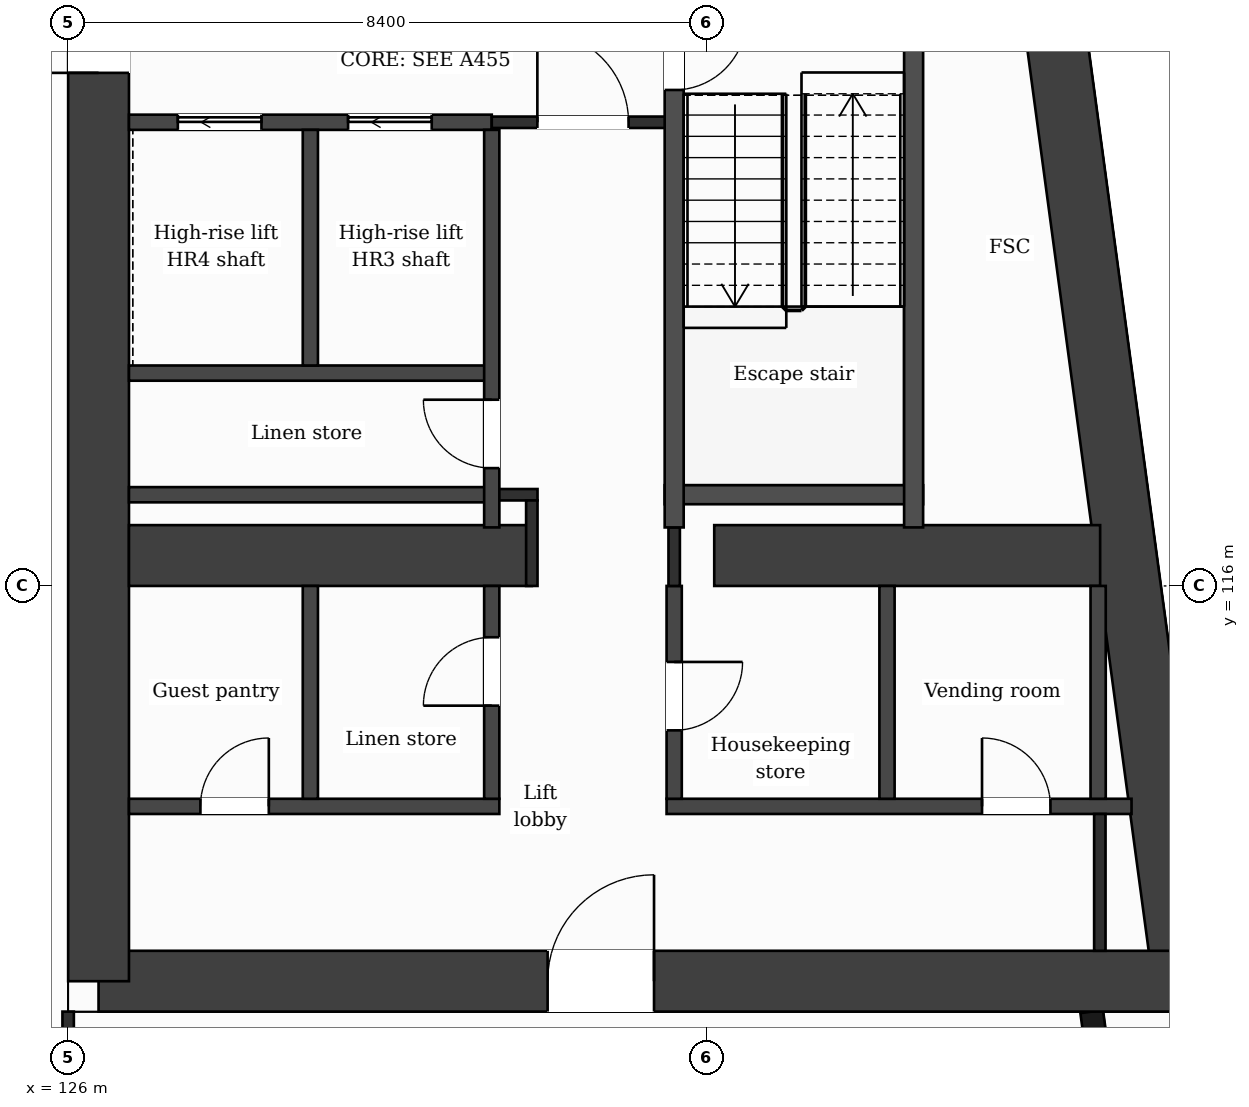
"""IFC4 building model, lengths in metres.
Left out: names, types, materials, properties, quantities, classifications, styles, units other than length and angle.
Written with IfcOpenShell. Run it as: python <this file> out.ifc"""

import sys

from ifc_helpers import new_model, si_unit, direction, frame, frame_2d, origin, place, context, subcontext, project, spatial, rectangle, extrude, element, fill, save


model = new_model("IFC4")
c1 = context("Model", 3, precision=1e-05, world=origin(), true_north=direction((0.0, 1.0)))
c2 = subcontext(c1, "Body", "Model", "MODEL_VIEW")
j1 = project(units=[si_unit("LENGTHUNIT", "METRE"), si_unit("PLANEANGLEUNIT", "RADIAN")], contexts=[c1])
p1 = place(None, origin())
s1 = spatial("IfcSite", under=j1, at=p1, CompositionType="ELEMENT")
p2 = place(p1, origin())
s2 = spatial("IfcBuilding", under=s1, at=p2, CompositionType="ELEMENT")
p3 = place(p2, frame((0.0, 0.0, 224.4)))
s3 = spatial("IfcBuildingStorey", under=s2, at=p3, CompositionType="ELEMENT", Elevation=224.4)
p4 = place(p3, frame((137.82, 132.0, 0.0), z_axis=(0.0, 0.0, 1.0), x_axis=(0.133408347329, -0.991061154956, 0.0)))
e1 = element("IfcWall", 1, at=p4, inside=s3, PredefinedType="SHEAR", context=c2, shape_type="SweptSolid", body=[
    extrude(rectangle(XDim=21.391, YDim=0.8, at=frame_2d((10.696, 0.0))), origin(), (0.0, 0.0, 1.0), 3.7),
])
p5 = place(p3, frame((140.673, 110.8, 0.0), z_axis=(0.0, 0.0, 1.0), x_axis=(-1.0, 0.0, 0.0)))
e2 = element("IfcWall", 2, at=p5, inside=s3, PredefinedType="SHEAR", context=c2, shape_type="SweptSolid", body=[
    extrude(rectangle(XDim=14.273, YDim=0.8, at=frame_2d((7.137, 0.0))), origin(), (0.0, 0.0, 1.0), 3.7),
])
p6 = place(p5, frame((6.965, 0.0, 0.0)))
e3 = element("IfcOpeningElement", 3, at=p6, cuts=e2, PredefinedType="OPENING", context=c2, shape_type="SweptSolid", body=[
    extrude(rectangle(XDim=1.4, YDim=2.1, at=frame_2d((0.7, 1.05))), frame((0.0, 0.41, 0.0), z_axis=(0.0, -1.0, 0.0), x_axis=(1.0, 0.0, 0.0)), (0.0, 0.0, 1.0), 0.82),
])
p7 = place(p3, frame((126.4, 110.8, 0.0), z_axis=(0.0, 0.0, 1.0), x_axis=(0.0, 1.0, 0.0)))
e4 = element("IfcWall", 4, at=p7, inside=s3, PredefinedType="SHEAR", context=c2, shape_type="SweptSolid", body=[
    extrude(rectangle(XDim=21.2, YDim=0.8, at=frame_2d((10.6, 0.0))), origin(), (0.0, 0.0, 1.0), 3.7),
])
p8 = place(p7, frame((11.95, 0.0, 0.0)))
e5 = element("IfcOpeningElement", 5, at=p8, cuts=e4, PredefinedType="OPENING", context=c2, shape_type="SweptSolid", body=[
    extrude(rectangle(XDim=1.4, YDim=2.1, at=frame_2d((0.7, 1.05))), frame((0.0, 0.41, 0.0), z_axis=(0.0, -1.0, 0.0), x_axis=(1.0, 0.0, 0.0)), (0.0, 0.0, 1.0), 0.82),
])
p9 = place(p3, frame((126.8, 116.4, 0.0), z_axis=(0.0, 0.0, 1.0), x_axis=(1.0, 0.0, 0.0)))
e6 = element("IfcWall", 6, at=p9, inside=s3, PredefinedType="SHEAR", context=c2, shape_type="SweptSolid", body=[
    extrude(rectangle(XDim=5.3, YDim=0.8, at=frame_2d((2.65, 0.0))), origin(), (0.0, 0.0, 1.0), 3.7),
])
p10 = place(p3, frame((134.5, 116.4, 0.0), z_axis=(0.0, 0.0, 1.0), x_axis=(1.0, 0.0, 0.0)))
e7 = element("IfcWall", 7, at=p10, inside=s3, PredefinedType="SHEAR", context=c2, shape_type="SweptSolid", body=[
    extrude(rectangle(XDim=5.077, YDim=0.8, at=frame_2d((2.539, 0.0))), origin(), (0.0, 0.0, 1.0), 3.7),
])
p11 = place(p3, frame((140.348, 103.85, 0.0), z_axis=(0.0, 0.0, 1.0), x_axis=(-0.133431549479, 0.991058031401, 0.0)))
e8 = element("IfcWall", 8, at=p11, inside=s3, PredefinedType="SOLIDWALL", context=c2, shape_type="SweptSolid", body=[
    extrude(rectangle(XDim=6.609, YDim=0.3, at=frame_2d((3.304, 0.0))), origin(), (0.0, 0.0, 1.0), 3.38),
])
p12 = place(p11, frame((0.737, 0.0, 0.9)))
e9 = element("IfcOpeningElement", 9, at=p12, cuts=e8, PredefinedType="OPENING", context=c2, shape_type="SweptSolid", body=[
    extrude(rectangle(XDim=1.2, YDim=2.1, at=frame_2d((0.6, 1.05))), frame((0.0, 0.16, 0.0), z_axis=(0.0, -1.0, 0.0), x_axis=(1.0, 0.0, 0.0)), (0.0, 0.0, 1.0), 0.32),
])
p13 = place(p11, frame((3.991, 0.0, 0.0)))
e10 = element("IfcOpeningElement", 10, at=p13, cuts=e8, PredefinedType="OPENING", context=c2, shape_type="SweptSolid", body=[
    extrude(rectangle(XDim=1.2, YDim=2.4, at=frame_2d((0.6, 1.2))), frame((0.0, 0.16, 0.0), z_axis=(0.0, -1.0, 0.0), x_axis=(1.0, 0.0, 0.0)), (0.0, 0.0, 1.0), 0.32),
])
p14 = place(p3, frame((126.8, 113.1, 0.0), z_axis=(0.0, 0.0, 1.0), x_axis=(1.0, 0.0, 0.0)))
e11 = element("IfcWall", 11, at=p14, inside=s3, PredefinedType="PARTITIONING", context=c2, shape_type="SweptSolid", body=[
    extrude(rectangle(XDim=4.873, YDim=0.2, at=frame_2d((2.437, 0.0))), origin(), (0.0, 0.0, 1.0), 3.38),
])
p15 = place(p14, frame((0.94, 0.0, 0.0)))
e12 = element("IfcOpeningElement", 12, at=p15, cuts=e11, PredefinedType="OPENING", context=c2, shape_type="SweptSolid", body=[
    extrude(rectangle(XDim=0.9, YDim=2.1, at=frame_2d((0.45, 1.05))), frame((0.0, 0.11, 0.0), z_axis=(0.0, -1.0, 0.0), x_axis=(1.0, 0.0, 0.0)), (0.0, 0.0, 1.0), 0.22),
])
p16 = place(p3, frame((133.873, 113.1, 0.0), z_axis=(0.0, 0.0, 1.0), x_axis=(1.0, 0.0, 0.0)))
e13 = element("IfcWall", 13, at=p16, inside=s3, PredefinedType="PARTITIONING", context=c2, shape_type="SweptSolid", body=[
    extrude(rectangle(XDim=6.117, YDim=0.2, at=frame_2d((3.059, 0.0))), origin(), (0.0, 0.0, 1.0), 3.38),
])
p17 = place(p16, frame((4.15, 0.0, 0.0)))
e14 = element("IfcOpeningElement", 14, at=p17, cuts=e13, PredefinedType="OPENING", context=c2, shape_type="SweptSolid", body=[
    extrude(rectangle(XDim=0.9, YDim=2.1, at=frame_2d((0.45, 1.05))), frame((0.0, 0.11, 0.0), z_axis=(0.0, -1.0, 0.0), x_axis=(1.0, 0.0, 0.0)), (0.0, 0.0, 1.0), 0.22),
])
p18 = place(p3, frame((126.8, 117.2, 0.0), z_axis=(0.0, 0.0, 1.0), x_axis=(1.0, 0.0, 0.0)))
e15 = element("IfcWall", 15, at=p18, inside=s3, PredefinedType="PARTITIONING", context=c2, shape_type="SweptSolid", body=[
    extrude(rectangle(XDim=4.773, YDim=0.2, at=frame_2d((2.386, 0.0))), origin(), (0.0, 0.0, 1.0), 3.38),
])
p19 = place(p3, frame((131.573, 117.2, 0.0), z_axis=(0.0, 0.0, 1.0), x_axis=(1.0, 0.0, 0.0)))
e16 = element("IfcWall", 16, at=p19, inside=s3, PredefinedType="PARTITIONING", context=c2, shape_type="SweptSolid", body=[
    extrude(rectangle(XDim=0.602, YDim=0.15, at=frame_2d((0.301, 0.0))), origin(), (0.0, 0.0, 1.0), 3.38),
])
p20 = place(p3, frame((133.848, 117.2, 0.0), z_axis=(0.0, 0.0, 1.0), x_axis=(1.0, 0.0, 0.0)))
e17 = element("IfcWall", 17, at=p20, inside=s3, PredefinedType="PARTITIONING", context=c2, shape_type="SweptSolid", body=[
    extrude(rectangle(XDim=3.4, YDim=0.25, at=frame_2d((1.7, 0.0))), origin(), (0.0, 0.0, 1.0), 3.38),
])
p21 = place(p3, frame((126.8, 118.8, 0.0), z_axis=(0.0, 0.0, 1.0), x_axis=(1.0, 0.0, 0.0)))
e18 = element("IfcWall", 18, at=p21, inside=s3, PredefinedType="PARTITIONING", context=c2, shape_type="SweptSolid", body=[
    extrude(rectangle(XDim=4.773, YDim=0.2, at=frame_2d((2.386, 0.0))), origin(), (0.0, 0.0, 1.0), 3.38),
])
p22 = place(p3, frame((126.8, 122.1, 0.0), z_axis=(0.0, 0.0, 1.0), x_axis=(1.0, 0.0, 0.0)))
e19 = element("IfcWall", 19, at=p22, inside=s3, PredefinedType="PARTITIONING", context=c2, shape_type="SweptSolid", body=[
    extrude(rectangle(XDim=4.773, YDim=0.2, at=frame_2d((2.386, 0.0))), origin(), (0.0, 0.0, 1.0), 3.38),
])
p23 = place(p22, frame((2.883, 0.0, 0.0)))
e20 = element("IfcOpeningElement", 20, at=p23, cuts=e19, PredefinedType="OPENING", context=c2, shape_type="SweptSolid", body=[
    extrude(rectangle(XDim=1.1, YDim=2.1, at=frame_2d((0.55, 1.05))), frame((0.0, 0.11, 0.0), z_axis=(0.0, -1.0, 0.0), x_axis=(1.0, 0.0, 0.0)), (0.0, 0.0, 1.0), 0.22),
])
p24 = place(p22, frame((0.643, 0.0, 0.0)))
e21 = element("IfcOpeningElement", 21, at=p24, cuts=e19, PredefinedType="OPENING", context=c2, shape_type="SweptSolid", body=[
    extrude(rectangle(XDim=1.1, YDim=2.1, at=frame_2d((0.55, 1.05))), frame((0.0, 0.11, 0.0), z_axis=(0.0, -1.0, 0.0), x_axis=(1.0, 0.0, 0.0)), (0.0, 0.0, 1.0), 0.22),
])
p25 = place(p3, frame((131.573, 122.1, 0.0), z_axis=(0.0, 0.0, 1.0), x_axis=(1.0, 0.0, 0.0)))
e22 = element("IfcWall", 22, at=p25, inside=s3, PredefinedType="PARTITIONING", context=c2, shape_type="SweptSolid", body=[
    extrude(rectangle(XDim=2.4, YDim=0.15, at=frame_2d((1.2, 0.0))), origin(), (0.0, 0.0, 1.0), 3.38),
])
p26 = place(p25, frame((0.6, 0.0, 0.0)))
e23 = element("IfcOpeningElement", 23, at=p26, cuts=e22, PredefinedType="OPENING", context=c2, shape_type="SweptSolid", body=[
    extrude(rectangle(XDim=1.2, YDim=2.1, at=frame_2d((0.6, 1.05))), frame((0.0, 0.085, 0.0), z_axis=(0.0, -1.0, 0.0), x_axis=(1.0, 0.0, 0.0)), (0.0, 0.0, 1.0), 0.17),
])
p27 = place(p3, frame((126.0, 109.075, 0.0), z_axis=(0.0, 0.0, 1.0), x_axis=(0.0, 1.0, 0.0)))
e24 = element("IfcWall", 24, at=p27, inside=s3, PredefinedType="PARTITIONING", context=c2, shape_type="SweptSolid", body=[
    extrude(rectangle(XDim=1.325, YDim=0.15, at=frame_2d((0.663, 0.0))), origin(), (0.0, 0.0, 1.0), 3.38),
])
p28 = place(p3, frame((129.187, 113.2, 0.0), z_axis=(0.0, 0.0, 1.0), x_axis=(0.0, 1.0, 0.0)))
e25 = element("IfcWall", 25, at=p28, inside=s3, PredefinedType="PARTITIONING", context=c2, shape_type="SweptSolid", body=[
    extrude(rectangle(XDim=2.8, YDim=0.2, at=frame_2d((1.4, 0.0))), origin(), (0.0, 0.0, 1.0), 3.38),
])
p29 = place(p3, frame((129.187, 118.9, 0.0), z_axis=(0.0, 0.0, 1.0), x_axis=(0.0, 1.0, 0.0)))
e26 = element("IfcWall", 26, at=p29, inside=s3, PredefinedType="PARTITIONING", context=c2, shape_type="SweptSolid", body=[
    extrude(rectangle(XDim=3.1, YDim=0.2, at=frame_2d((1.55, 0.0))), origin(), (0.0, 0.0, 1.0), 3.38),
])
p30 = place(p3, frame((131.573, 113.2, 0.0), z_axis=(0.0, 0.0, 1.0), x_axis=(0.0, 1.0, 0.0)))
e27 = element("IfcWall", 27, at=p30, inside=s3, PredefinedType="PARTITIONING", context=c2, shape_type="SweptSolid", body=[
    extrude(rectangle(XDim=2.8, YDim=0.2, at=frame_2d((1.4, 0.0))), origin(), (0.0, 0.0, 1.0), 3.38),
])
p31 = place(p30, frame((1.225, 0.0, 0.0)))
e28 = element("IfcOpeningElement", 28, at=p31, cuts=e27, PredefinedType="OPENING", context=c2, shape_type="SweptSolid", body=[
    extrude(rectangle(XDim=0.9, YDim=2.1, at=frame_2d((0.45, 1.05))), frame((0.0, 0.11, 0.0), z_axis=(0.0, -1.0, 0.0), x_axis=(1.0, 0.0, 0.0)), (0.0, 0.0, 1.0), 0.22),
])
p32 = place(p3, frame((131.573, 116.77, 0.0), z_axis=(0.0, 0.0, 1.0), x_axis=(0.0, 1.0, 0.0)))
e29 = element("IfcWall", 29, at=p32, inside=s3, PredefinedType="PARTITIONING", context=c2, shape_type="SweptSolid", body=[
    extrude(rectangle(XDim=5.23, YDim=0.2, at=frame_2d((2.615, 0.0))), origin(), (0.0, 0.0, 1.0), 3.38),
])
p33 = place(p32, frame((0.78, 0.0, 0.0)))
e30 = element("IfcOpeningElement", 30, at=p33, cuts=e29, PredefinedType="OPENING", context=c2, shape_type="SweptSolid", body=[
    extrude(rectangle(XDim=0.9, YDim=2.1, at=frame_2d((0.45, 1.05))), frame((0.0, 0.11, 0.0), z_axis=(0.0, -1.0, 0.0), x_axis=(1.0, 0.0, 0.0)), (0.0, 0.0, 1.0), 0.22),
])
p34 = place(p3, frame((132.1, 116.0, 0.0), z_axis=(0.0, 0.0, 1.0), x_axis=(0.0, 1.0, 0.0)))
e31 = element("IfcWall", 31, at=p34, inside=s3, PredefinedType="PARTITIONING", context=c2, shape_type="SweptSolid", body=[
    extrude(rectangle(XDim=1.125, YDim=0.15, at=frame_2d((0.562, 0.0))), origin(), (0.0, 0.0, 1.0), 3.38),
])
p35 = place(p3, frame((133.973, 113.2, 0.0), z_axis=(0.0, 0.0, 1.0), x_axis=(0.0, 1.0, 0.0)))
e32 = element("IfcWall", 32, at=p35, inside=s3, PredefinedType="PARTITIONING", context=c2, shape_type="SweptSolid", body=[
    extrude(rectangle(XDim=2.8, YDim=0.2, at=frame_2d((1.4, 0.0))), origin(), (0.0, 0.0, 1.0), 3.38),
])
p36 = place(p35, frame((0.9, 0.0, 0.0)))
e33 = element("IfcOpeningElement", 33, at=p36, cuts=e32, PredefinedType="OPENING", context=c2, shape_type="SweptSolid", body=[
    extrude(rectangle(XDim=0.9, YDim=2.1, at=frame_2d((0.45, 1.05))), frame((0.0, 0.11, 0.0), z_axis=(0.0, -1.0, 0.0), x_axis=(1.0, 0.0, 0.0)), (0.0, 0.0, 1.0), 0.22),
])
p37 = place(p3, frame((133.973, 116.0, 0.0), z_axis=(0.0, 0.0, 1.0), x_axis=(0.0, 1.0, 0.0)))
e34 = element("IfcWall", 34, at=p37, inside=s3, PredefinedType="PARTITIONING", context=c2, shape_type="SweptSolid", body=[
    extrude(rectangle(XDim=0.77, YDim=0.15, at=frame_2d((0.385, 0.0))), origin(), (0.0, 0.0, 1.0), 3.38),
])
p38 = place(p3, frame((133.973, 116.77, 0.0), z_axis=(0.0, 0.0, 1.0), x_axis=(0.0, 1.0, 0.0)))
e35 = element("IfcWall", 35, at=p38, inside=s3, PredefinedType="PARTITIONING", context=c2, shape_type="SweptSolid", body=[
    extrude(rectangle(XDim=7.055, YDim=0.25, at=frame_2d((3.527, 0.0))), origin(), (0.0, 0.0, 1.0), 3.38),
])
p39 = place(p38, frame((5.755, 0.0, 0.0)))
e36 = element("IfcOpeningElement", 36, at=p39, cuts=e35, PredefinedType="OPENING", context=c2, shape_type="SweptSolid", body=[
    extrude(rectangle(XDim=0.95, YDim=2.1, at=frame_2d((0.475, 1.05))), frame((0.0, 0.135, 0.0), z_axis=(0.0, -1.0, 0.0), x_axis=(1.0, 0.0, 0.0)), (0.0, 0.0, 1.0), 0.27),
])
p40 = place(p3, frame((136.773, 113.2, 0.0), z_axis=(0.0, 0.0, 1.0), x_axis=(0.0, 1.0, 0.0)))
e37 = element("IfcWall", 37, at=p40, inside=s3, PredefinedType="PARTITIONING", context=c2, shape_type="SweptSolid", body=[
    extrude(rectangle(XDim=2.8, YDim=0.2, at=frame_2d((1.4, 0.0))), origin(), (0.0, 0.0, 1.0), 3.38),
])
p41 = place(p3, frame((137.123, 116.77, 0.0), z_axis=(0.0, 0.0, 1.0), x_axis=(0.0, 1.0, 0.0)))
e38 = element("IfcWall", 38, at=p41, inside=s3, PredefinedType="PARTITIONING", context=c2, shape_type="SweptSolid", body=[
    extrude(rectangle(XDim=7.055, YDim=0.25, at=frame_2d((3.527, 0.0))), origin(), (0.0, 0.0, 1.0), 3.38),
])
p42 = place(p3, frame((139.551, 113.2, 0.0), z_axis=(0.0, 0.0, 1.0), x_axis=(0.0, 1.0, 0.0)))
e39 = element("IfcWall", 39, at=p42, inside=s3, PredefinedType="PARTITIONING", context=c2, shape_type="SweptSolid", body=[
    extrude(rectangle(XDim=2.8, YDim=0.2, at=frame_2d((1.4, 0.0))), origin(), (0.0, 0.0, 1.0), 3.38),
])
p43 = place(p3, frame((139.573, 111.2, 0.0), z_axis=(0.0, 0.0, 1.0), x_axis=(0.0, 1.0, 0.0)))
e40 = element("IfcWall", 40, at=p43, inside=s3, PredefinedType="PARTITIONING", context=c2, shape_type="SweptSolid", body=[
    extrude(rectangle(XDim=1.8, YDim=0.15, at=frame_2d((0.9, 0.0))), origin(), (0.0, 0.0, 1.0), 3.38),
])
p44 = place(p26, origin())
e41 = element("IfcDoor", 41, at=p44, inside=s3, OperationType="SINGLE_SWING_LEFT", PredefinedType="DOOR", context=c2, shape_type="SweptSolid", body=[
    extrude(rectangle(XDim=1.2, YDim=2.1, at=frame_2d((0.6, 1.05))), frame((0.0, 0.025, 0.0), z_axis=(0.0, -1.0, 0.0), x_axis=(1.0, 0.0, 0.0)), (0.0, 0.0, 1.0), 0.05),
])
fill(e23, e41)
p45 = place(p23, origin())
e42 = element("IfcDoor", 42, at=p45, inside=s3, OperationType="SLIDING_TO_LEFT", PredefinedType="DOOR", context=c2, shape_type="SweptSolid", body=[
    extrude(rectangle(XDim=1.1, YDim=2.1, at=frame_2d((0.55, 1.05))), frame((0.0, 0.025, 0.0), z_axis=(0.0, -1.0, 0.0), x_axis=(1.0, 0.0, 0.0)), (0.0, 0.0, 1.0), 0.05),
])
fill(e20, e42)
p46 = place(p24, origin())
e43 = element("IfcDoor", 43, at=p46, inside=s3, OperationType="SLIDING_TO_LEFT", PredefinedType="DOOR", context=c2, shape_type="SweptSolid", body=[
    extrude(rectangle(XDim=1.1, YDim=2.1, at=frame_2d((0.55, 1.05))), frame((0.0, 0.025, 0.0), z_axis=(0.0, -1.0, 0.0), x_axis=(1.0, 0.0, 0.0)), (0.0, 0.0, 1.0), 0.05),
])
fill(e21, e43)
p47 = place(p39, origin())
e44 = element("IfcDoor", 44, at=p47, inside=s3, OperationType="SINGLE_SWING_RIGHT", PredefinedType="DOOR", context=c2, shape_type="SweptSolid", body=[
    extrude(rectangle(XDim=0.95, YDim=2.1, at=frame_2d((0.475, 1.05))), frame((0.0, 0.025, 0.0), z_axis=(0.0, -1.0, 0.0), x_axis=(1.0, 0.0, 0.0)), (0.0, 0.0, 1.0), 0.05),
])
fill(e36, e44)
p48 = place(p33, origin())
e45 = element("IfcDoor", 45, at=p48, inside=s3, OperationType="SINGLE_SWING_RIGHT", PredefinedType="DOOR", context=c2, shape_type="SweptSolid", body=[
    extrude(rectangle(XDim=0.9, YDim=2.1, at=frame_2d((0.45, 1.05))), frame((0.0, 0.025, 0.0), z_axis=(0.0, -1.0, 0.0), x_axis=(1.0, 0.0, 0.0)), (0.0, 0.0, 1.0), 0.05),
])
fill(e30, e45)
p49 = place(p17, origin())
e46 = element("IfcDoor", 46, at=p49, inside=s3, OperationType="SINGLE_SWING_LEFT", PredefinedType="DOOR", context=c2, shape_type="SweptSolid", body=[
    extrude(rectangle(XDim=0.9, YDim=2.1, at=frame_2d((0.45, 1.05))), frame((0.0, 0.025, 0.0), z_axis=(0.0, -1.0, 0.0), x_axis=(1.0, 0.0, 0.0)), (0.0, 0.0, 1.0), 0.05),
])
fill(e14, e46)
p50 = place(p36, origin())
e47 = element("IfcDoor", 47, at=p50, inside=s3, OperationType="SINGLE_SWING_RIGHT", PredefinedType="DOOR", context=c2, shape_type="SweptSolid", body=[
    extrude(rectangle(XDim=0.9, YDim=2.1, at=frame_2d((0.45, 1.05))), frame((0.0, 0.025, 0.0), z_axis=(0.0, -1.0, 0.0), x_axis=(1.0, 0.0, 0.0)), (0.0, 0.0, 1.0), 0.05),
])
fill(e33, e47)
p51 = place(p31, origin())
e48 = element("IfcDoor", 48, at=p51, inside=s3, OperationType="SINGLE_SWING_LEFT", PredefinedType="DOOR", context=c2, shape_type="SweptSolid", body=[
    extrude(rectangle(XDim=0.9, YDim=2.1, at=frame_2d((0.45, 1.05))), frame((0.0, 0.025, 0.0), z_axis=(0.0, -1.0, 0.0), x_axis=(1.0, 0.0, 0.0)), (0.0, 0.0, 1.0), 0.05),
])
fill(e28, e48)
p52 = place(p15, origin())
e49 = element("IfcDoor", 49, at=p52, inside=s3, OperationType="SINGLE_SWING_RIGHT", PredefinedType="DOOR", context=c2, shape_type="SweptSolid", body=[
    extrude(rectangle(XDim=0.9, YDim=2.1, at=frame_2d((0.45, 1.05))), frame((0.0, 0.025, 0.0), z_axis=(0.0, -1.0, 0.0), x_axis=(1.0, 0.0, 0.0)), (0.0, 0.0, 1.0), 0.05),
])
fill(e12, e49)
p53 = place(p6, origin())
e50 = element("IfcDoor", 50, at=p53, inside=s3, OperationType="SINGLE_SWING_LEFT", PredefinedType="DOOR", context=c2, shape_type="SweptSolid", body=[
    extrude(rectangle(XDim=1.4, YDim=2.1, at=frame_2d((0.7, 1.05))), frame((0.0, 0.025, 0.0), z_axis=(0.0, -1.0, 0.0), x_axis=(1.0, 0.0, 0.0)), (0.0, 0.0, 1.0), 0.05),
])
fill(e3, e50)
p54 = place(p8, origin())
e51 = element("IfcDoor", 51, at=p54, inside=s3, OperationType="SINGLE_SWING_LEFT", PredefinedType="DOOR", context=c2, shape_type="SweptSolid", body=[
    extrude(rectangle(XDim=1.4, YDim=2.1, at=frame_2d((0.7, 1.05))), frame((0.0, 0.025, 0.0), z_axis=(0.0, -1.0, 0.0), x_axis=(1.0, 0.0, 0.0)), (0.0, 0.0, 1.0), 0.05),
])
fill(e5, e51)
save(model, sys.argv[1])
